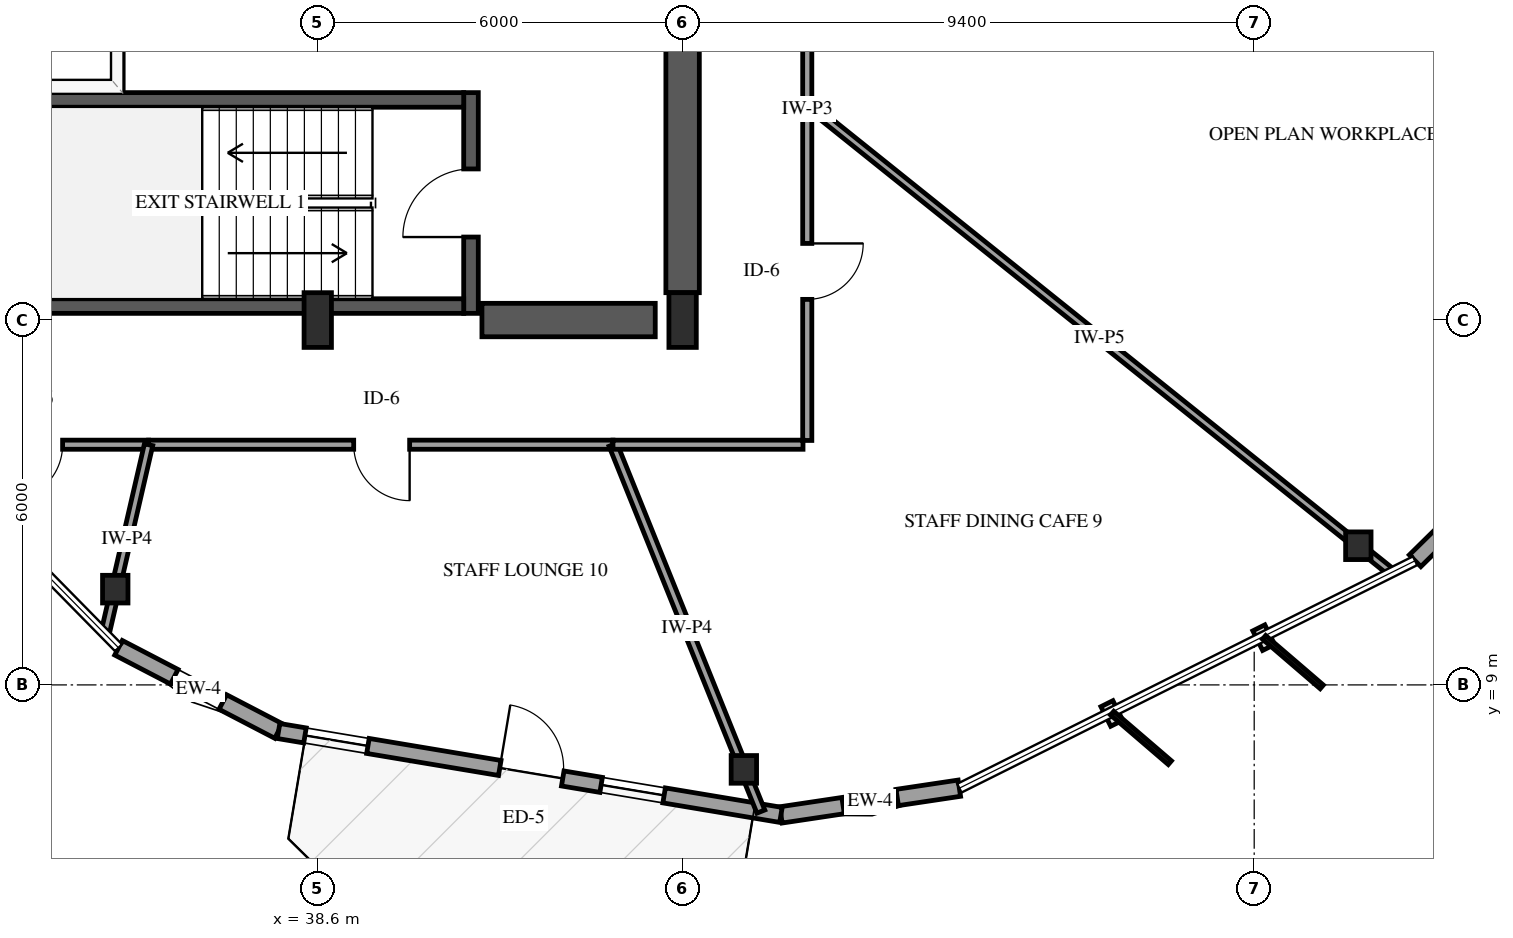
"""IFC4 building model, lengths in metres.
Left out: names, types, materials, properties, quantities, classifications, styles, units other than length and angle.
Written with IfcOpenShell. Run it as: python <this file> out.ifc"""

import sys

from ifc_helpers import new_model, si_unit, direction, frame, frame_2d, origin, origin_2d, place, context, subcontext, project, spatial, rectangle, i_section, extrude, element, fill, save


model = new_model("IFC4")
c1 = context("Model", 3, precision=1e-05, world=origin(), true_north=direction((0.0, 1.0)))
c2 = subcontext(c1, "Body", "Model", "MODEL_VIEW")
j1 = project(units=[si_unit("LENGTHUNIT", "METRE"), si_unit("PLANEANGLEUNIT", "RADIAN")], contexts=[c1])
p1 = place(None, origin())
s1 = spatial("IfcSite", under=j1, at=p1, CompositionType="ELEMENT")
p2 = place(p1, origin())
s2 = spatial("IfcBuilding", under=s1, at=p2, CompositionType="ELEMENT")
p3 = place(p2, frame((0.0, 0.0, 130.3)))
s3 = spatial("IfcBuildingStorey", under=s2, at=p3, CompositionType="ELEMENT", Elevation=130.3)
p4 = place(p3, frame((41.12, 15.11, 0.0), z_axis=(0.0, 0.0, 1.0), x_axis=(0.0, 1.0, 0.0)))
e1 = element("IfcWall", 1, at=p4, inside=s3, PredefinedType="SHEAR", context=c2, shape_type="SweptSolid", body=[
    extrude(rectangle(XDim=3.63, YDim=0.24, at=frame_2d((1.815, 0.0))), origin(), (0.0, 0.0, 1.0), 3.9),
])
p5 = place(p4, frame((1.255, 0.0, 0.0)))
e2 = element("IfcOpeningElement", 2, at=p5, cuts=e1, PredefinedType="OPENING", context=c2, shape_type="SweptSolid", body=[
    extrude(rectangle(XDim=1.12, YDim=2.15, at=frame_2d((0.56, 1.075))), frame((0.0, 0.13, 0.0), z_axis=(0.0, -1.0, 0.0), x_axis=(1.0, 0.0, 0.0)), (0.0, 0.0, 1.0), 0.26),
])
for number, where, z_axis, x_axis in (
    (3, (33.0, 15.23, 0.0), (0.0, 0.0, 1.0), (1.0, 0.0, 0.0)),
    (4, (33.0, 18.62, 0.0), (0.0, 0.0, 1.0), (1.0, 0.0, 0.0)),
):
    element("IfcWall", number, at=place(p3, frame(where, z_axis=z_axis, x_axis=x_axis)), inside=s3, PredefinedType="SHEAR", context=c2, shape_type="SweptSolid", body=[
        extrude(rectangle(XDim=8.0, YDim=0.24, at=frame_2d((4.0, 0.0))), origin(), (0.0, 0.0, 1.0), 3.9),
    ])
p6 = place(p3, frame((41.3, 15.0, 0.0), z_axis=(0.0, 0.0, 1.0), x_axis=(1.0, 0.0, 0.0)))
e5 = element("IfcWall", 5, at=p6, inside=s3, PredefinedType="SHEAR", context=c2, shape_type="SweptSolid", body=[
    extrude(rectangle(XDim=2.85, YDim=0.55, at=frame_2d((1.425, 0.0))), origin(), (0.0, 0.0, 1.0), 3.9),
])
p7 = place(p3, frame((44.6, 15.45, 0.0), z_axis=(0.0, 0.0, 1.0), x_axis=(0.0, 1.0, 0.0)))
e6 = element("IfcWall", 6, at=p7, inside=s3, PredefinedType="SHEAR", context=c2, shape_type="SweptSolid", body=[
    extrude(rectangle(XDim=6.35, YDim=0.55, at=frame_2d((3.175, 0.0))), origin(), (0.0, 0.0, 1.0), 3.9),
])
for number, where, z_axis, x_axis in (
    (7, (38.6, 15.0, 0.0), (0.0, 0.0, 1.0), (1.0, 0.0, 0.0)),
    (8, (44.6, 15.0, 0.0), (0.0, 0.0, 1.0), (1.0, 0.0, 0.0)),
):
    element("IfcColumn", number, at=place(p3, frame(where, z_axis=z_axis, x_axis=x_axis)), inside=s3, PredefinedType="PILASTER", context=c2, shape_type="SweptSolid", body=[
        extrude(rectangle(XDim=0.45, YDim=0.9, at=origin_2d()), origin(), (0.0, 0.0, 1.0), 3.9),
    ])
for number, where, z_axis, x_axis in (
    (9, (35.27, 10.575, 0.0), (0.0, 0.0, 1.0), (1.0, 0.0, 0.0)),
    (10, (45.607, 7.611, 0.0), (0.0, 0.0, 1.0), (1.0, 0.0, 0.0)),
    (11, (55.712, 11.289, 0.0), (0.0, 0.0, 1.0), (1.0, 0.0, 0.0)),
):
    element("IfcColumn", number, at=place(p3, frame(where, z_axis=z_axis, x_axis=x_axis)), inside=s3, PredefinedType="COLUMN", context=c2, shape_type="SweptSolid", body=[
        extrude(i_section(OverallWidth=0.418, OverallDepth=0.455, WebThickness=0.042, FlangeThickness=0.068, FilletRadius=0.038, at=origin_2d()), origin(), (0.0, 0.0, 1.0), 3.9),
    ])
p8 = place(p3, frame((35.324, 9.611, 0.0), z_axis=(0.0, 0.0, 1.0), x_axis=(0.887169636056, -0.461443427585, 0.0)))
e12 = element("IfcWall", 12, at=p8, inside=s3, PredefinedType="SOLIDWALL", context=c2, shape_type="SweptSolid", body=[
    extrude(rectangle(XDim=2.967, YDim=0.27, at=frame_2d((1.483, 0.0))), origin(), (0.0, 0.0, 1.0), 2.939),
])
p9 = place(p8, frame((1.033, 0.0, 0.75)))
e13 = element("IfcOpeningElement", 13, at=p9, cuts=e12, PredefinedType="OPENING", context=c2, shape_type="SweptSolid", body=[
    extrude(rectangle(XDim=0.9, YDim=1.5, at=frame_2d((0.45, 0.75))), frame((0.0, 0.145, 0.0), z_axis=(0.0, -1.0, 0.0), x_axis=(1.0, 0.0, 0.0)), (0.0, 0.0, 1.0), 0.29),
])
p10 = place(p3, frame((46.217, 6.862, 0.0), z_axis=(0.0, 0.0, 1.0), x_axis=(0.988967117617, 0.148135209429, 0.0)))
e14 = element("IfcWall", 14, at=p10, inside=s3, PredefinedType="SOLIDWALL", context=c2, shape_type="SweptSolid", body=[
    extrude(rectangle(XDim=2.967, YDim=0.27, at=frame_2d((1.483, 0.0))), origin(), (0.0, 0.0, 1.0), 2.939),
])
p11 = place(p10, frame((1.033, 0.0, 0.75)))
e15 = element("IfcOpeningElement", 15, at=p11, cuts=e14, PredefinedType="OPENING", context=c2, shape_type="SweptSolid", body=[
    extrude(rectangle(XDim=0.9, YDim=1.5, at=frame_2d((0.45, 0.75))), frame((0.0, 0.145, 0.0), z_axis=(0.0, -1.0, 0.0), x_axis=(1.0, 0.0, 0.0)), (0.0, 0.0, 1.0), 0.29),
])
p12 = place(p3, frame((37.956, 8.242, 0.0), z_axis=(0.0, 0.0, 1.0), x_axis=(0.986341882167, -0.164710933101, 0.0)))
e16 = element("IfcWall", 16, at=p12, inside=s3, PredefinedType="SOLIDWALL", context=c2, shape_type="SweptSolid", body=[
    extrude(rectangle(XDim=8.376, YDim=0.25, at=frame_2d((4.188, 0.0))), origin(), (0.0, 0.0, 1.0), 2.939),
])
p13 = place(p12, frame((3.688, 0.0, 0.0)))
e17 = element("IfcOpeningElement", 17, at=p13, cuts=e16, PredefinedType="OPENING", context=c2, shape_type="SweptSolid", body=[
    extrude(rectangle(XDim=1.05, YDim=2.15, at=frame_2d((0.525, 1.075))), frame((0.0, 0.135, 0.0), z_axis=(0.0, -1.0, 0.0), x_axis=(1.0, 0.0, 0.0)), (0.0, 0.0, 1.0), 0.27),
])
p14 = place(p12, frame((0.44, 0.0, 0.72)))
e18 = element("IfcOpeningElement", 18, at=p14, cuts=e16, PredefinedType="OPENING", context=c2, shape_type="SweptSolid", body=[
    extrude(rectangle(XDim=1.05, YDim=1.55, at=frame_2d((0.525, 0.775))), frame((0.0, 0.135, 0.0), z_axis=(0.0, -1.0, 0.0), x_axis=(1.0, 0.0, 0.0)), (0.0, 0.0, 1.0), 0.27),
])
p15 = place(p12, frame((5.378, 0.0, 0.72)))
e19 = element("IfcOpeningElement", 19, at=p15, cuts=e16, PredefinedType="OPENING", context=c2, shape_type="SweptSolid", body=[
    extrude(rectangle(XDim=1.05, YDim=1.55, at=frame_2d((0.525, 0.775))), frame((0.0, 0.135, 0.0), z_axis=(0.0, -1.0, 0.0), x_axis=(1.0, 0.0, 0.0)), (0.0, 0.0, 1.0), 0.27),
])
p16 = place(p3, frame((56.646, 11.042, 0.0), z_axis=(0.0, 0.0, 1.0), x_axis=(0.713048365922, 0.701114846409, 0.0)))
e20 = element("IfcWall", 20, at=p16, inside=s3, PredefinedType="SOLIDWALL", context=c2, shape_type="SweptSolid", body=[
    extrude(rectangle(XDim=2.967, YDim=0.27, at=frame_2d((1.483, 0.0))), origin(), (0.0, 0.0, 1.0), 2.939),
])
p17 = place(p16, frame((1.033, 0.0, 0.75)))
e21 = element("IfcOpeningElement", 21, at=p17, cuts=e20, PredefinedType="OPENING", context=c2, shape_type="SweptSolid", body=[
    extrude(rectangle(XDim=0.9, YDim=1.5, at=frame_2d((0.45, 0.75))), frame((0.0, 0.145, 0.0), z_axis=(0.0, -1.0, 0.0), x_axis=(1.0, 0.0, 0.0)), (0.0, 0.0, 1.0), 0.29),
])
p18 = place(p3, frame((35.3, 18.79, 0.0), z_axis=(0.0, 0.0, 1.0), x_axis=(0.0, 1.0, 0.0)))
e22 = element("IfcWall", 22, at=p18, inside=s3, PredefinedType="SOLIDWALL", context=c2, shape_type="SweptSolid", body=[
    extrude(rectangle(XDim=2.55, YDim=0.2, at=frame_2d((1.275, 0.0))), origin(), (0.0, 0.0, 1.0), 3.56),
])
p19 = place(p18, frame((0.725, 0.0, 0.0)))
e23 = element("IfcOpeningElement", 23, at=p19, cuts=e22, PredefinedType="OPENING", context=c2, shape_type="SweptSolid", body=[
    extrude(rectangle(XDim=1.1, YDim=2.15, at=frame_2d((0.55, 1.075))), frame((0.0, 0.11, 0.0), z_axis=(0.0, -1.0, 0.0), x_axis=(1.0, 0.0, 0.0)), (0.0, 0.0, 1.0), 0.22),
])
p20 = place(p3, frame((46.65, 18.55, 0.0), z_axis=(0.0, 0.0, 1.0), x_axis=(0.78035987764, -0.625330681615, 0.0)))
e24 = element("IfcWall", 24, at=p20, inside=s3, PredefinedType="PARTITIONING", context=c2, shape_type="SweptSolid", body=[
    extrude(rectangle(XDim=12.315, YDim=0.13, at=frame_2d((6.157, 0.0))), origin(), (0.0, 0.0, 1.0), 3.56),
])
p21 = place(p3, frame((43.455, 12.95, 0.0), z_axis=(0.0, 0.0, 1.0), x_axis=(-1.0, 0.0, 0.0)))
e25 = element("IfcWall", 25, at=p21, inside=s3, PredefinedType="PARTITIONING", context=c2, shape_type="SweptSolid", body=[
    extrude(rectangle(XDim=7.637, YDim=0.15, at=frame_2d((3.818, 0.0))), origin(), (0.0, 0.0, 1.0), 3.56),
])
p22 = place(p21, frame((3.344, 0.0, 0.0)))
e26 = element("IfcOpeningElement", 26, at=p22, cuts=e25, PredefinedType="OPENING", context=c2, shape_type="SweptSolid", body=[
    extrude(rectangle(XDim=0.92, YDim=2.12, at=frame_2d((0.46, 1.06))), frame((0.0, 0.085, 0.0), z_axis=(0.0, -1.0, 0.0), x_axis=(1.0, 0.0, 0.0)), (0.0, 0.0, 1.0), 0.17),
])
p23 = place(p3, frame((43.455, 12.95, 0.0), z_axis=(0.0, 0.0, 1.0), x_axis=(0.373867836137, -0.927481989638, 0.0)))
e27 = element("IfcWall", 27, at=p23, inside=s3, PredefinedType="PARTITIONING", context=c2, shape_type="SweptSolid", body=[
    extrude(rectangle(XDim=6.505, YDim=0.14, at=frame_2d((3.252, 0.0))), origin(), (0.0, 0.0, 1.0), 2.855),
])
p24 = place(p3, frame((46.65, 18.55, 0.0), z_axis=(0.0, 0.0, 1.0), x_axis=(0.0, -1.0, 0.0)))
e28 = element("IfcWall", 28, at=p24, inside=s3, PredefinedType="PARTITIONING", context=c2, shape_type="SweptSolid", body=[
    extrude(rectangle(XDim=5.53, YDim=0.15, at=frame_2d((2.765, 0.0))), origin(), (0.0, 0.0, 1.0), 3.56),
])
p25 = place(p24, frame((2.29, 0.0, 0.0)))
e29 = element("IfcOpeningElement", 29, at=p25, cuts=e28, PredefinedType="OPENING", context=c2, shape_type="SweptSolid", body=[
    extrude(rectangle(XDim=0.92, YDim=2.12, at=frame_2d((0.46, 1.06))), frame((0.0, 0.085, 0.0), z_axis=(0.0, -1.0, 0.0), x_axis=(1.0, 0.0, 0.0)), (0.0, 0.0, 1.0), 0.17),
])
p26 = place(p3, frame((46.65, 23.93, 0.0), z_axis=(0.0, 0.0, 1.0), x_axis=(0.0, -1.0, 0.0)))
e30 = element("IfcWall", 30, at=p26, inside=s3, PredefinedType="PARTITIONING", context=c2, shape_type="SweptSolid", body=[
    extrude(rectangle(XDim=5.38, YDim=0.15, at=frame_2d((2.69, 0.0))), origin(), (0.0, 0.0, 1.0), 3.56),
])
p27 = place(p3, frame((35.818, 12.95, 0.0), z_axis=(0.0, 0.0, 1.0), x_axis=(-1.0, 0.0, 0.0)))
e31 = element("IfcWall", 31, at=p27, inside=s3, PredefinedType="PARTITIONING", context=c2, shape_type="SweptSolid", body=[
    extrude(rectangle(XDim=3.778, YDim=0.15, at=frame_2d((1.889, 0.0))), origin(), (0.0, 0.0, 1.0), 3.56),
])
p28 = place(p27, frame((1.414, 0.0, 0.0)))
e32 = element("IfcOpeningElement", 32, at=p28, cuts=e31, PredefinedType="OPENING", context=c2, shape_type="SweptSolid", body=[
    extrude(rectangle(XDim=0.92, YDim=2.12, at=frame_2d((0.46, 1.06))), frame((0.0, 0.085, 0.0), z_axis=(0.0, -1.0, 0.0), x_axis=(1.0, 0.0, 0.0)), (0.0, 0.0, 1.0), 0.17),
])
p29 = place(p3, frame((35.818, 12.95, 0.0), z_axis=(0.0, 0.0, 1.0), x_axis=(-0.224814843935, -0.974401501408, 0.0)))
e33 = element("IfcWall", 33, at=p29, inside=s3, PredefinedType="PARTITIONING", context=c2, shape_type="SweptSolid", body=[
    extrude(rectangle(XDim=3.194, YDim=0.14, at=frame_2d((1.597, 0.0))), origin(), (0.0, 0.0, 1.0), 2.855),
])
p30 = place(p3, frame((46.58, 12.95, 0.0), z_axis=(0.0, 0.0, 1.0), x_axis=(-1.0, 0.0, 0.0)))
e34 = element("IfcWall", 34, at=p30, inside=s3, PredefinedType="PARTITIONING", context=c2, shape_type="SweptSolid", body=[
    extrude(rectangle(XDim=3.125, YDim=0.15, at=frame_2d((1.562, 0.0))), origin(), (0.0, 0.0, 1.0), 3.56),
])
p31 = place(p9, origin())
e35 = element("IfcWindow", 35, at=p31, inside=s3, PartitioningType="SINGLE_PANEL", PredefinedType="WINDOW", context=c2, shape_type="SweptSolid", body=[
    extrude(rectangle(XDim=0.9, YDim=1.5, at=frame_2d((0.45, 0.75))), frame((0.0, 0.03, 0.0), z_axis=(0.0, -1.0, 0.0), x_axis=(1.0, 0.0, 0.0)), (0.0, 0.0, 1.0), 0.06),
])
fill(e13, e35)
p32 = place(p11, origin())
e36 = element("IfcWindow", 36, at=p32, inside=s3, PartitioningType="SINGLE_PANEL", PredefinedType="WINDOW", context=c2, shape_type="SweptSolid", body=[
    extrude(rectangle(XDim=0.9, YDim=1.5, at=frame_2d((0.45, 0.75))), frame((0.0, 0.03, 0.0), z_axis=(0.0, -1.0, 0.0), x_axis=(1.0, 0.0, 0.0)), (0.0, 0.0, 1.0), 0.06),
])
fill(e15, e36)
p33 = place(p13, origin())
e37 = element("IfcDoor", 37, at=p33, inside=s3, OperationType="SINGLE_SWING_LEFT", PredefinedType="DOOR", context=c2, shape_type="SweptSolid", body=[
    extrude(rectangle(XDim=1.05, YDim=2.15, at=frame_2d((0.525, 1.075))), frame((0.0, 0.025, 0.0), z_axis=(0.0, -1.0, 0.0), x_axis=(1.0, 0.0, 0.0)), (0.0, 0.0, 1.0), 0.05),
])
fill(e17, e37)
p34 = place(p14, origin())
e38 = element("IfcWindow", 38, at=p34, inside=s3, PartitioningType="SINGLE_PANEL", PredefinedType="WINDOW", context=c2, shape_type="SweptSolid", body=[
    extrude(rectangle(XDim=1.05, YDim=1.55, at=frame_2d((0.525, 0.775))), frame((0.0, 0.03, 0.0), z_axis=(0.0, -1.0, 0.0), x_axis=(1.0, 0.0, 0.0)), (0.0, 0.0, 1.0), 0.06),
])
fill(e18, e38)
p35 = place(p15, origin())
e39 = element("IfcWindow", 39, at=p35, inside=s3, PartitioningType="SINGLE_PANEL", PredefinedType="WINDOW", context=c2, shape_type="SweptSolid", body=[
    extrude(rectangle(XDim=1.05, YDim=1.55, at=frame_2d((0.525, 0.775))), frame((0.0, 0.03, 0.0), z_axis=(0.0, -1.0, 0.0), x_axis=(1.0, 0.0, 0.0)), (0.0, 0.0, 1.0), 0.06),
])
fill(e19, e39)
p36 = place(p5, origin())
e40 = element("IfcDoor", 40, at=p36, inside=s3, OperationType="SINGLE_SWING_LEFT", PredefinedType="DOOR", context=c2, shape_type="SweptSolid", body=[
    extrude(rectangle(XDim=1.12, YDim=2.15, at=frame_2d((0.56, 1.075))), frame((0.0, 0.025, 0.0), z_axis=(0.0, -1.0, 0.0), x_axis=(1.0, 0.0, 0.0)), (0.0, 0.0, 1.0), 0.05),
])
fill(e2, e40)
p37 = place(p22, origin())
e41 = element("IfcDoor", 41, at=p37, inside=s3, OperationType="SINGLE_SWING_LEFT", PredefinedType="DOOR", context=c2, shape_type="SweptSolid", body=[
    extrude(rectangle(XDim=0.92, YDim=2.12, at=frame_2d((0.46, 1.06))), frame((0.0, 0.025, 0.0), z_axis=(0.0, -1.0, 0.0), x_axis=(1.0, 0.0, 0.0)), (0.0, 0.0, 1.0), 0.05),
])
fill(e26, e41)
p38 = place(p25, origin())
e42 = element("IfcDoor", 42, at=p38, inside=s3, OperationType="SINGLE_SWING_LEFT", PredefinedType="DOOR", context=c2, shape_type="SweptSolid", body=[
    extrude(rectangle(XDim=0.92, YDim=2.12, at=frame_2d((0.46, 1.06))), frame((0.0, 0.025, 0.0), z_axis=(0.0, -1.0, 0.0), x_axis=(1.0, 0.0, 0.0)), (0.0, 0.0, 1.0), 0.05),
])
fill(e29, e42)
p39 = place(p28, origin())
e43 = element("IfcDoor", 43, at=p39, inside=s3, OperationType="SINGLE_SWING_RIGHT", PredefinedType="DOOR", context=c2, shape_type="SweptSolid", body=[
    extrude(rectangle(XDim=0.92, YDim=2.12, at=frame_2d((0.46, 1.06))), frame((0.0, 0.025, 0.0), z_axis=(0.0, -1.0, 0.0), x_axis=(1.0, 0.0, 0.0)), (0.0, 0.0, 1.0), 0.05),
])
fill(e32, e43)
save(model, sys.argv[1])
